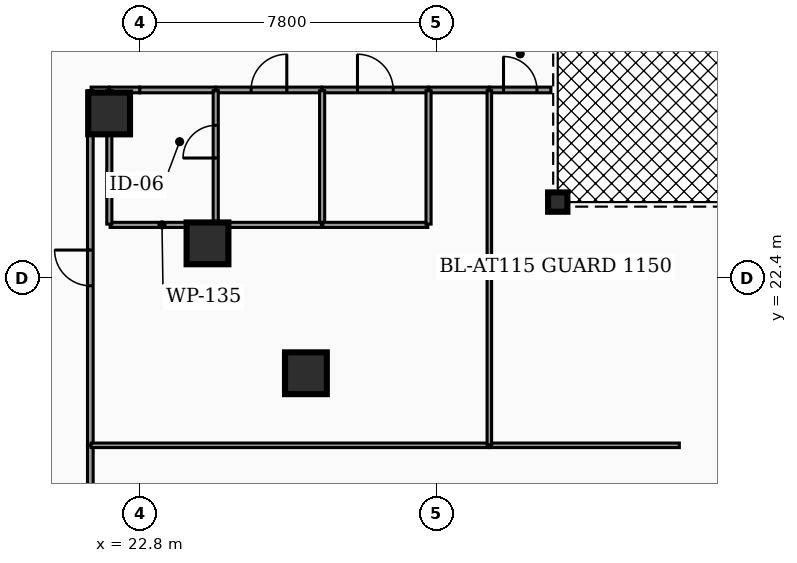
"""IFC4 building model, lengths in metres.
Left out: names, types, materials, properties, quantities, classifications, styles, units other than length and angle.
Written with IfcOpenShell. Run it as: python <this file> out.ifc"""

import sys

from ifc_helpers import new_model, si_unit, direction, frame, frame_2d, origin, origin_2d, place, context, subcontext, project, spatial, rectangle, hollow_rectangle, hollow_circle, extrude, element, fill, save


model = new_model("IFC4")
c1 = context("Model", 3, precision=1e-05, world=origin(), true_north=direction((0.0, 1.0)))
c2 = subcontext(c1, "Body", "Model", "MODEL_VIEW")
j1 = project(units=[si_unit("LENGTHUNIT", "METRE"), si_unit("PLANEANGLEUNIT", "RADIAN")], contexts=[c1])
p1 = place(None, origin())
s1 = spatial("IfcSite", under=j1, at=p1, CompositionType="ELEMENT")
p2 = place(p1, origin())
s2 = spatial("IfcBuilding", under=s1, at=p2, CompositionType="ELEMENT")
p3 = place(p2, frame((0.0, 0.0, 9.52)))
s3 = spatial("IfcBuildingStorey", under=s2, at=p3, CompositionType="ELEMENT", Elevation=9.52)
for number, where, z_axis, x_axis in (
    (1, (21.994, 26.732, 0.0), (0.0, 0.0, 1.0), (1.0, 0.0, 0.0)),
    (2, (24.583, 23.314, 0.0), (0.0, 0.0, 1.0), (1.0, 0.0, 0.0)),
    (3, (27.173, 19.896, 0.0), (0.0, 0.0, 1.0), (1.0, 0.0, 0.0)),
):
    element("IfcColumn", number, at=place(p3, frame(where, z_axis=z_axis, x_axis=x_axis)), inside=s3, PredefinedType="COLUMN", context=c2, shape_type="SweptSolid", body=[
        extrude(hollow_rectangle(XDim=1.1, YDim=1.1, WallThickness=0.055, at=origin_2d()), origin(), (0.0, 0.0, 1.0), 4.14),
    ])
p4 = place(p3, frame((33.8, 24.4, 0.0), z_axis=(0.0, 0.0, 1.0), x_axis=(1.0, 0.0, 0.0)))
e4 = element("IfcColumn", 4, at=p4, inside=s3, PredefinedType="COLUMN", context=c2, shape_type="SweptSolid", body=[
    extrude(hollow_circle(Radius=0.254, WallThickness=0.02, at=origin_2d()), origin(), (0.0, 0.0, 1.0), 4.14),
])
p5 = place(p3, frame((22.8, 27.35, 0.0), z_axis=(0.0, 0.0, 1.0), x_axis=(1.0, 0.0, 0.0)))
e5 = element("IfcWall", 5, at=p5, inside=s3, PredefinedType="PARTITIONING", context=c2, shape_type="SweptSolid", body=[
    extrude(rectangle(XDim=1.995, YDim=0.15, at=frame_2d((0.998, 0.0))), origin(), (0.0, 0.0, 1.0), 3.097),
])
p6 = place(p3, frame((22.005, 27.35, 0.0), z_axis=(0.0, 0.0, 1.0), x_axis=(1.0, 0.0, 0.0)))
e6 = element("IfcWall", 6, at=p6, inside=s3, PredefinedType="PARTITIONING", context=c2, shape_type="SweptSolid", body=[
    extrude(rectangle(XDim=0.795, YDim=0.15, at=frame_2d((0.397, 0.0))), origin(), (0.0, 0.0, 1.0), 3.097),
])
p7 = place(p3, frame((24.805, 27.35, 0.0), z_axis=(0.0, 0.0, 1.0), x_axis=(1.0, 0.0, 0.0)))
e7 = element("IfcWall", 7, at=p7, inside=s3, PredefinedType="PARTITIONING", context=c2, shape_type="SweptSolid", body=[
    extrude(rectangle(XDim=2.79, YDim=0.15, at=frame_2d((1.395, 0.0))), origin(), (0.0, 0.0, 1.0), 3.097),
])
p8 = place(p7, frame((0.925, 0.0, 0.0)))
e8 = element("IfcOpeningElement", 8, at=p8, cuts=e7, PredefinedType="OPENING", context=c2, shape_type="SweptSolid", body=[
    extrude(rectangle(XDim=0.94, YDim=2.05, at=frame_2d((0.47, 1.025))), frame((0.0, 0.085, 0.0), z_axis=(0.0, -1.0, 0.0), x_axis=(1.0, 0.0, 0.0)), (0.0, 0.0, 1.0), 0.17),
])
p9 = place(p3, frame((27.605, 27.35, 0.0), z_axis=(0.0, 0.0, 1.0), x_axis=(1.0, 0.0, 0.0)))
e9 = element("IfcWall", 9, at=p9, inside=s3, PredefinedType="PARTITIONING", context=c2, shape_type="SweptSolid", body=[
    extrude(rectangle(XDim=2.79, YDim=0.15, at=frame_2d((1.395, 0.0))), origin(), (0.0, 0.0, 1.0), 3.097),
])
p10 = place(p9, frame((0.925, 0.0, 0.0)))
e10 = element("IfcOpeningElement", 10, at=p10, cuts=e9, PredefinedType="OPENING", context=c2, shape_type="SweptSolid", body=[
    extrude(rectangle(XDim=0.94, YDim=2.05, at=frame_2d((0.47, 1.025))), frame((0.0, 0.085, 0.0), z_axis=(0.0, -1.0, 0.0), x_axis=(1.0, 0.0, 0.0)), (0.0, 0.0, 1.0), 0.17),
])
p11 = place(p3, frame((21.5, 12.02, 0.0), z_axis=(0.0, 0.0, 1.0), x_axis=(0.0, 1.0, 0.0)))
e11 = element("IfcWall", 11, at=p11, inside=s3, PredefinedType="PARTITIONING", context=c2, shape_type="SweptSolid", body=[
    extrude(rectangle(XDim=5.975, YDim=0.15, at=frame_2d((2.988, 0.0))), origin(), (0.0, 0.0, 1.0), 3.097),
])
p12 = place(p11, frame((2.427, 0.0, 0.0)))
e12 = element("IfcOpeningElement", 12, at=p12, cuts=e11, PredefinedType="OPENING", context=c2, shape_type="SweptSolid", body=[
    extrude(rectangle(XDim=1.12, YDim=2.05, at=frame_2d((0.56, 1.025))), frame((0.0, 0.085, 0.0), z_axis=(0.0, -1.0, 0.0), x_axis=(1.0, 0.0, 0.0)), (0.0, 0.0, 1.0), 0.17),
])
p13 = place(p3, frame((30.405, 27.35, 0.0), z_axis=(0.0, 0.0, 1.0), x_axis=(1.0, 0.0, 0.0)))
e13 = element("IfcWall", 13, at=p13, inside=s3, PredefinedType="PARTITIONING", context=c2, shape_type="SweptSolid", body=[
    extrude(rectangle(XDim=1.59, YDim=0.15, at=frame_2d((0.795, 0.0))), origin(), (0.0, 0.0, 1.0), 3.097),
])
p14 = place(p3, frame((21.52, 27.35, 0.0), z_axis=(0.0, 0.0, 1.0), x_axis=(1.0, 0.0, 0.0)))
e14 = element("IfcWall", 14, at=p14, inside=s3, PredefinedType="PARTITIONING", context=c2, shape_type="SweptSolid", body=[
    extrude(rectangle(XDim=0.475, YDim=0.15, at=frame_2d((0.238, 0.0))), origin(), (0.0, 0.0, 1.0), 3.097),
])
p15 = place(p3, frame((21.5, 18.005, 0.0), z_axis=(0.0, 0.0, 1.0), x_axis=(0.0, 1.0, 0.0)))
e15 = element("IfcWall", 15, at=p15, inside=s3, PredefinedType="PARTITIONING", context=c2, shape_type="SweptSolid", body=[
    extrude(rectangle(XDim=9.325, YDim=0.15, at=frame_2d((4.663, 0.0))), origin(), (0.0, 0.0, 1.0), 3.097),
])
p16 = place(p15, frame((4.192, 0.0, 0.0)))
e16 = element("IfcOpeningElement", 16, at=p16, cuts=e15, PredefinedType="OPENING", context=c2, shape_type="SweptSolid", body=[
    extrude(rectangle(XDim=0.94, YDim=2.05, at=frame_2d((0.47, 1.025))), frame((0.0, 0.085, 0.0), z_axis=(0.0, -1.0, 0.0), x_axis=(1.0, 0.0, 0.0)), (0.0, 0.0, 1.0), 0.17),
])
p17 = place(p3, frame((32.005, 27.35, 0.0), z_axis=(0.0, 0.0, 1.0), x_axis=(1.0, 0.0, 0.0)))
e17 = element("IfcWall", 17, at=p17, inside=s3, PredefinedType="PARTITIONING", context=c2, shape_type="SweptSolid", body=[
    extrude(rectangle(XDim=1.615, YDim=0.15, at=frame_2d((0.808, 0.0))), origin(), (0.0, 0.0, 1.0), 3.097),
])
p18 = place(p17, frame((0.367, 0.0, 0.0)))
e18 = element("IfcOpeningElement", 18, at=p18, cuts=e17, PredefinedType="OPENING", context=c2, shape_type="SweptSolid", body=[
    extrude(rectangle(XDim=0.88, YDim=2.05, at=frame_2d((0.44, 1.025))), frame((0.0, 0.085, 0.0), z_axis=(0.0, -1.0, 0.0), x_axis=(1.0, 0.0, 0.0)), (0.0, 0.0, 1.0), 0.17),
])
p19 = place(p3, frame((24.8, 23.848, 0.0), z_axis=(0.0, 0.0, 1.0), x_axis=(0.0, 1.0, 0.0)))
e19 = element("IfcWall", 19, at=p19, inside=s3, PredefinedType="PARTITIONING", context=c2, shape_type="SweptSolid", body=[
    extrude(rectangle(XDim=3.482, YDim=0.135, at=frame_2d((1.741, 0.0))), origin(), (0.0, 0.0, 1.0), 3.097),
])
p20 = place(p19, frame((1.711, 0.0, 0.0)))
e20 = element("IfcOpeningElement", 20, at=p20, cuts=e19, PredefinedType="OPENING", context=c2, shape_type="SweptSolid", body=[
    extrude(rectangle(XDim=0.86, YDim=2.05, at=frame_2d((0.43, 1.025))), frame((0.0, 0.077, 0.0), z_axis=(0.0, -1.0, 0.0), x_axis=(1.0, 0.0, 0.0)), (0.0, 0.0, 1.0), 0.155),
])
p21 = place(p3, frame((22.02, 23.8, 0.0), z_axis=(0.0, 0.0, 1.0), x_axis=(1.0, 0.0, 0.0)))
e21 = element("IfcWall", 21, at=p21, inside=s3, PredefinedType="PARTITIONING", context=c2, shape_type="SweptSolid", body=[
    extrude(rectangle(XDim=2.732, YDim=0.135, at=frame_2d((1.366, 0.0))), origin(), (0.0, 0.0, 1.0), 3.097),
])
for number, where, z_axis, x_axis in (
    (22, (22.0, 23.82, 0.0), (0.0, 0.0, 1.0), (0.0, 1.0, 0.0)),
    (23, (27.6, 23.82, 0.0), (0.0, 0.0, 1.0), (0.0, 1.0, 0.0)),
):
    element("IfcWall", number, at=place(p3, frame(where, z_axis=z_axis, x_axis=x_axis)), inside=s3, PredefinedType="PARTITIONING", context=c2, shape_type="SweptSolid", body=[
        extrude(rectangle(XDim=3.51, YDim=0.135, at=frame_2d((1.755, 0.0))), origin(), (0.0, 0.0, 1.0), 3.097),
    ])
p22 = place(p3, frame((24.848, 23.8, 0.0), z_axis=(0.0, 0.0, 1.0), x_axis=(1.0, 0.0, 0.0)))
e24 = element("IfcWall", 24, at=p22, inside=s3, PredefinedType="PARTITIONING", context=c2, shape_type="SweptSolid", body=[
    extrude(rectangle(XDim=2.732, YDim=0.135, at=frame_2d((1.366, 0.0))), origin(), (0.0, 0.0, 1.0), 3.097),
])
p23 = place(p3, frame((27.62, 23.8, 0.0), z_axis=(0.0, 0.0, 1.0), x_axis=(1.0, 0.0, 0.0)))
e25 = element("IfcWall", 25, at=p23, inside=s3, PredefinedType="PARTITIONING", context=c2, shape_type="SweptSolid", body=[
    extrude(rectangle(XDim=2.76, YDim=0.135, at=frame_2d((1.38, 0.0))), origin(), (0.0, 0.0, 1.0), 3.097),
])
p24 = place(p3, frame((30.4, 23.82, 0.0), z_axis=(0.0, 0.0, 1.0), x_axis=(0.0, 1.0, 0.0)))
e26 = element("IfcWall", 26, at=p24, inside=s3, PredefinedType="PARTITIONING", context=c2, shape_type="SweptSolid", body=[
    extrude(rectangle(XDim=3.51, YDim=0.135, at=frame_2d((1.755, 0.0))), origin(), (0.0, 0.0, 1.0), 3.097),
])
p25 = place(p3, frame((21.52, 18.0, 0.0), z_axis=(0.0, 0.0, 1.0), x_axis=(1.0, 0.0, 0.0)))
e27 = element("IfcWall", 27, at=p25, inside=s3, PredefinedType="PARTITIONING", context=c2, shape_type="SweptSolid", body=[
    extrude(rectangle(XDim=10.46, YDim=0.12, at=frame_2d((5.23, 0.0))), origin(), (0.0, 0.0, 1.0), 3.097),
])
p26 = place(p3, frame((32.02, 18.0, 0.0), z_axis=(0.0, 0.0, 1.0), x_axis=(1.0, 0.0, 0.0)))
e28 = element("IfcWall", 28, at=p26, inside=s3, PredefinedType="PARTITIONING", context=c2, shape_type="SweptSolid", body=[
    extrude(rectangle(XDim=4.98, YDim=0.12, at=frame_2d((2.49, 0.0))), origin(), (0.0, 0.0, 1.0), 3.097),
])
p27 = place(p3, frame((32.0, 18.02, 0.0), z_axis=(0.0, 0.0, 1.0), x_axis=(0.0, 1.0, 0.0)))
e29 = element("IfcWall", 29, at=p27, inside=s3, PredefinedType="PARTITIONING", context=c2, shape_type="SweptSolid", body=[
    extrude(rectangle(XDim=9.31, YDim=0.12, at=frame_2d((4.655, 0.0))), origin(), (0.0, 0.0, 1.0), 3.097),
])
p28 = place(p8, origin())
e30 = element("IfcDoor", 30, at=p28, inside=s3, OperationType="SINGLE_SWING_RIGHT", PredefinedType="DOOR", context=c2, shape_type="SweptSolid", body=[
    extrude(rectangle(XDim=0.94, YDim=2.05, at=frame_2d((0.47, 1.025))), frame((0.0, 0.025, 0.0), z_axis=(0.0, -1.0, 0.0), x_axis=(1.0, 0.0, 0.0)), (0.0, 0.0, 1.0), 0.05),
])
fill(e8, e30)
p29 = place(p10, origin())
e31 = element("IfcDoor", 31, at=p29, inside=s3, OperationType="SINGLE_SWING_LEFT", PredefinedType="DOOR", context=c2, shape_type="SweptSolid", body=[
    extrude(rectangle(XDim=0.94, YDim=2.05, at=frame_2d((0.47, 1.025))), frame((0.0, 0.025, 0.0), z_axis=(0.0, -1.0, 0.0), x_axis=(1.0, 0.0, 0.0)), (0.0, 0.0, 1.0), 0.05),
])
fill(e10, e31)
p30 = place(p16, origin())
e32 = element("IfcDoor", 32, at=p30, inside=s3, OperationType="SINGLE_SWING_RIGHT", PredefinedType="DOOR", context=c2, shape_type="SweptSolid", body=[
    extrude(rectangle(XDim=0.94, YDim=2.05, at=frame_2d((0.47, 1.025))), frame((0.0, 0.025, 0.0), z_axis=(0.0, -1.0, 0.0), x_axis=(1.0, 0.0, 0.0)), (0.0, 0.0, 1.0), 0.05),
])
fill(e16, e32)
p31 = place(p18, origin())
e33 = element("IfcDoor", 33, at=p31, inside=s3, OperationType="SINGLE_SWING_LEFT", PredefinedType="DOOR", context=c2, shape_type="SweptSolid", body=[
    extrude(rectangle(XDim=0.88, YDim=2.05, at=frame_2d((0.44, 1.025))), frame((0.0, 0.025, 0.0), z_axis=(0.0, -1.0, 0.0), x_axis=(1.0, 0.0, 0.0)), (0.0, 0.0, 1.0), 0.05),
])
fill(e18, e33)
p32 = place(p20, origin())
e34 = element("IfcDoor", 34, at=p32, inside=s3, OperationType="SINGLE_SWING_LEFT", PredefinedType="DOOR", context=c2, shape_type="SweptSolid", body=[
    extrude(rectangle(XDim=0.86, YDim=2.05, at=frame_2d((0.43, 1.025))), frame((0.0, 0.025, 0.0), z_axis=(0.0, -1.0, 0.0), x_axis=(1.0, 0.0, 0.0)), (0.0, 0.0, 1.0), 0.05),
])
fill(e20, e34)
save(model, sys.argv[1])
